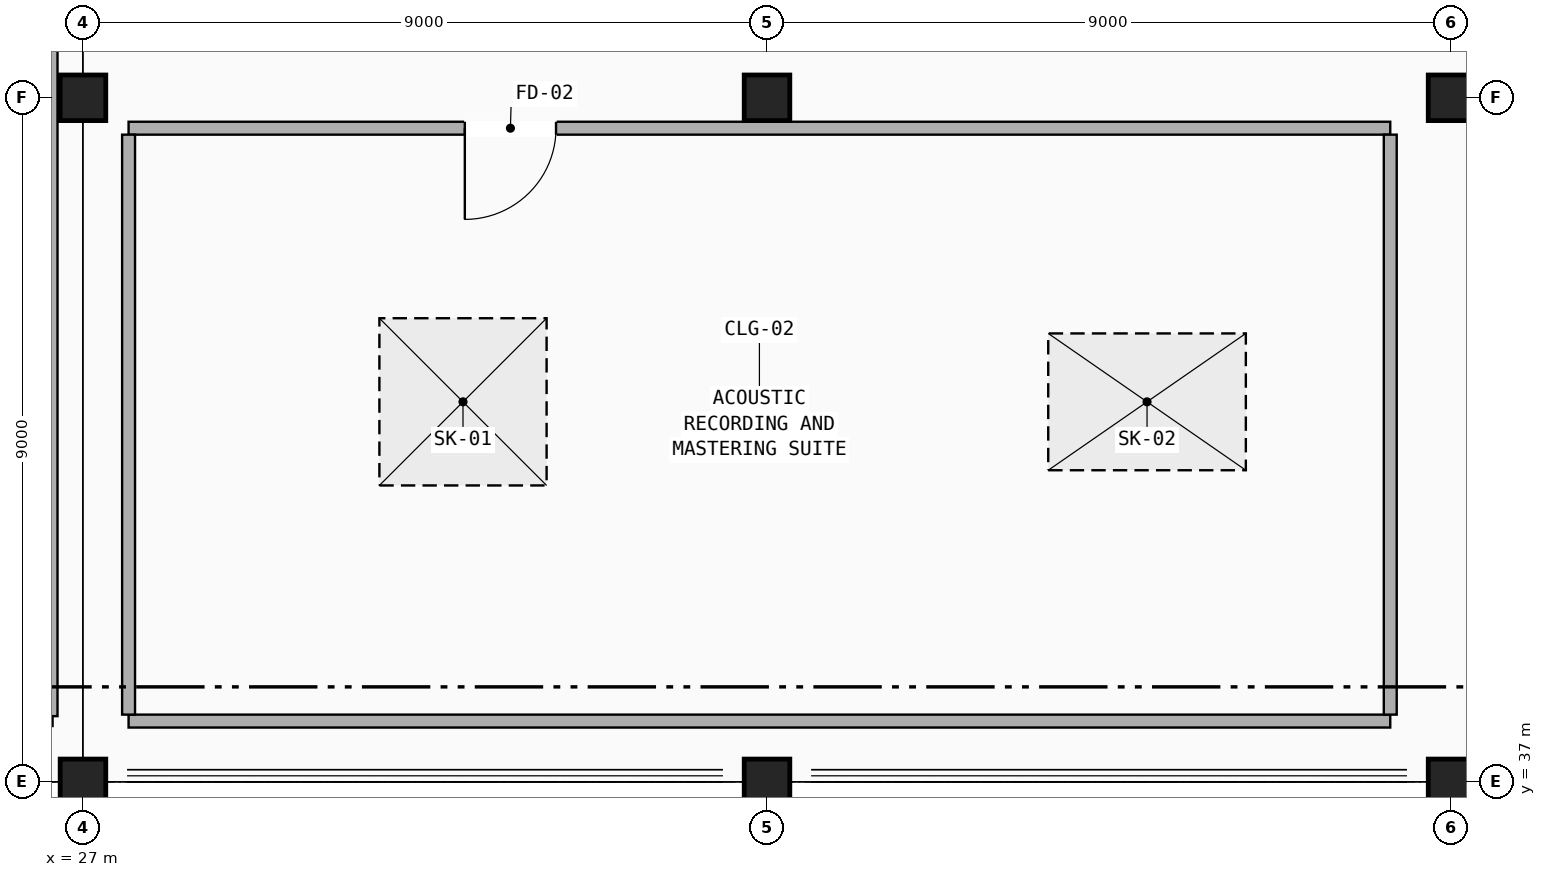
"""IFC4 building model, lengths in metres.
Left out: names, types, materials, properties, quantities, classifications, styles, units other than length and angle.
Written with IfcOpenShell. Run it as: python <this file> out.ifc"""

import sys

from ifc_helpers import new_model, si_unit, direction, frame, frame_2d, origin, origin_2d, place, context, subcontext, project, spatial, rectangle, extrude, element, fill, save


model = new_model("IFC4")
c1 = context("Model", 3, precision=1e-05, world=origin(), true_north=direction((0.0, 1.0)))
c2 = subcontext(c1, "Body", "Model", "MODEL_VIEW")
j1 = project(units=[si_unit("LENGTHUNIT", "METRE"), si_unit("PLANEANGLEUNIT", "RADIAN")], contexts=[c1])
p1 = place(None, origin())
s1 = spatial("IfcSite", under=j1, at=p1, CompositionType="ELEMENT")
p2 = place(p1, origin())
s2 = spatial("IfcBuilding", under=s1, at=p2, CompositionType="ELEMENT")
p3 = place(p2, frame((0.0, 0.0, 21.76)))
s3 = spatial("IfcBuildingStorey", under=s2, at=p3, CompositionType="ELEMENT", Elevation=21.76)
p4 = place(p3, frame((27.0, 37.0, 0.0), z_axis=(0.0, 0.0, 1.0), x_axis=(1.0, 0.0, 0.0)))
e1 = element("IfcColumn", 1, at=p4, inside=s3, PredefinedType="COLUMN", context=c2, shape_type="SweptSolid", body=[
    extrude(rectangle(XDim=0.6, YDim=0.6, at=origin_2d()), origin(), (0.0, 0.0, 1.0), 9.0),
])
p5 = place(p3, frame((27.0, 46.0, 0.0), z_axis=(0.0, 0.0, 1.0), x_axis=(1.0, 0.0, 0.0)))
e2 = element("IfcColumn", 2, at=p5, inside=s3, PredefinedType="COLUMN", context=c2, shape_type="SweptSolid", body=[
    extrude(rectangle(XDim=0.6, YDim=0.6, at=origin_2d()), origin(), (0.0, 0.0, 1.0), 7.987),
])
p6 = place(p3, frame((36.0, 37.0, 0.0), z_axis=(0.0, 0.0, 1.0), x_axis=(1.0, 0.0, 0.0)))
e3 = element("IfcColumn", 3, at=p6, inside=s3, PredefinedType="COLUMN", context=c2, shape_type="SweptSolid", body=[
    extrude(rectangle(XDim=0.6, YDim=0.6, at=origin_2d()), origin(), (0.0, 0.0, 1.0), 9.0),
])
p7 = place(p3, frame((36.0, 46.0, 0.0), z_axis=(0.0, 0.0, 1.0), x_axis=(1.0, 0.0, 0.0)))
e4 = element("IfcColumn", 4, at=p7, inside=s3, PredefinedType="COLUMN", context=c2, shape_type="SweptSolid", body=[
    extrude(rectangle(XDim=0.6, YDim=0.6, at=origin_2d()), origin(), (0.0, 0.0, 1.0), 7.987),
])
p8 = place(p3, frame((45.0, 37.0, 0.0), z_axis=(0.0, 0.0, 1.0), x_axis=(1.0, 0.0, 0.0)))
e5 = element("IfcColumn", 5, at=p8, inside=s3, PredefinedType="COLUMN", context=c2, shape_type="SweptSolid", body=[
    extrude(rectangle(XDim=0.6, YDim=0.6, at=origin_2d()), origin(), (0.0, 0.0, 1.0), 9.0),
])
p9 = place(p3, frame((45.0, 46.0, 0.0), z_axis=(0.0, 0.0, 1.0), x_axis=(1.0, 0.0, 0.0)))
e6 = element("IfcColumn", 6, at=p9, inside=s3, PredefinedType="COLUMN", context=c2, shape_type="SweptSolid", body=[
    extrude(rectangle(XDim=0.6, YDim=0.6, at=origin_2d()), origin(), (0.0, 0.0, 1.0), 7.987),
])
p10 = place(p3, frame((26.6, 37.865, 0.0), z_axis=(0.0, 0.0, 1.0), x_axis=(0.0, 1.0, 0.0)))
e7 = element("IfcWall", 7, at=p10, inside=s3, PredefinedType="PARTITIONING", context=c2, shape_type="SweptSolid", body=[
    extrude(rectangle(XDim=17.47, YDim=0.13, at=frame_2d((8.735, 0.0))), origin(), (0.0, 0.0, 1.0), 3.594),
])
p11 = place(p10, frame((10.32, 0.0, 0.0)))
e8 = element("IfcOpeningElement", 8, at=p11, cuts=e7, PredefinedType="OPENING", context=c2, shape_type="SweptSolid", body=[
    extrude(rectangle(XDim=1.4, YDim=2.2, at=frame_2d((0.7, 1.1))), frame((0.0, 0.075, 0.0), z_axis=(0.0, -1.0, 0.0), x_axis=(1.0, 0.0, 0.0)), (0.0, 0.0, 1.0), 0.15),
])
p12 = place(p3, frame((27.6, 37.8, 0.0), z_axis=(0.0, 0.0, 1.0), x_axis=(1.0, 0.0, 0.0)))
e9 = element("IfcWall", 9, at=p12, inside=s3, PredefinedType="PARTITIONING", context=c2, shape_type="SweptSolid", body=[
    extrude(rectangle(XDim=16.6, YDim=0.17, at=frame_2d((8.3, 0.0))), origin(), (0.0, 0.0, 1.0), 2.989),
])
p13 = place(p3, frame((27.6, 45.6, 0.0), z_axis=(0.0, 0.0, 1.0), x_axis=(1.0, 0.0, 0.0)))
e10 = element("IfcWall", 10, at=p13, inside=s3, PredefinedType="PARTITIONING", context=c2, shape_type="SweptSolid", body=[
    extrude(rectangle(XDim=16.6, YDim=0.17, at=frame_2d((8.3, 0.0))), origin(), (0.0, 0.0, 1.0), 2.989),
])
p14 = place(p13, frame((4.424, 0.0, 0.0)))
e11 = element("IfcOpeningElement", 11, at=p14, cuts=e10, PredefinedType="OPENING", context=c2, shape_type="SweptSolid", body=[
    extrude(rectangle(XDim=1.2, YDim=2.2, at=frame_2d((0.6, 1.1))), frame((0.0, 0.095, 0.0), z_axis=(0.0, -1.0, 0.0), x_axis=(1.0, 0.0, 0.0)), (0.0, 0.0, 1.0), 0.19),
])
for number, where, z_axis, x_axis in (
    (12, (27.6, 37.885, 0.0), (0.0, 0.0, 1.0), (0.0, 1.0, 0.0)),
    (13, (44.2, 37.885, 0.0), (0.0, 0.0, 1.0), (0.0, 1.0, 0.0)),
):
    element("IfcWall", number, at=place(p3, frame(where, z_axis=z_axis, x_axis=x_axis)), inside=s3, PredefinedType="PARTITIONING", context=c2, shape_type="SweptSolid", body=[
        extrude(rectangle(XDim=7.63, YDim=0.17, at=frame_2d((3.815, 0.0))), origin(), (0.0, 0.0, 1.0), 8.236),
    ])
p15 = place(p3, frame((0.0, 0.0, -0.24)))
p16 = place(p15, frame((32.0, 42.0, 0.19)))
e14 = element("IfcWindow", 14, at=p16, inside=s3, PartitioningType="SINGLE_PANEL", PredefinedType="SKYLIGHT", context=c2, shape_type="SweptSolid", body=[
    extrude(rectangle(XDim=2.2, YDim=2.2, at=origin_2d()), origin(), (0.0, 0.0, 1.0), 0.05),
])
p17 = place(p15, frame((41.0, 42.0, 0.19)))
e15 = element("IfcWindow", 15, at=p17, inside=s3, PartitioningType="SINGLE_PANEL", PredefinedType="SKYLIGHT", context=c2, shape_type="SweptSolid", body=[
    extrude(rectangle(XDim=2.6, YDim=1.8, at=origin_2d()), origin(), (0.0, 0.0, 1.0), 0.05),
])
p18 = place(p14, frame((1.2, 0.0, 0.0), z_axis=(0.0, 0.0, 1.0), x_axis=(-1.0, 0.0, 0.0)))
e16 = element("IfcDoor", 16, at=p18, inside=s3, OperationType="SINGLE_SWING_RIGHT", PredefinedType="DOOR", context=c2, shape_type="SweptSolid", body=[
    extrude(rectangle(XDim=1.2, YDim=2.2, at=frame_2d((0.6, 1.1))), frame((0.0, 0.025, 0.0), z_axis=(0.0, -1.0, 0.0), x_axis=(1.0, 0.0, 0.0)), (0.0, 0.0, 1.0), 0.05),
])
fill(e11, e16)
save(model, sys.argv[1])
